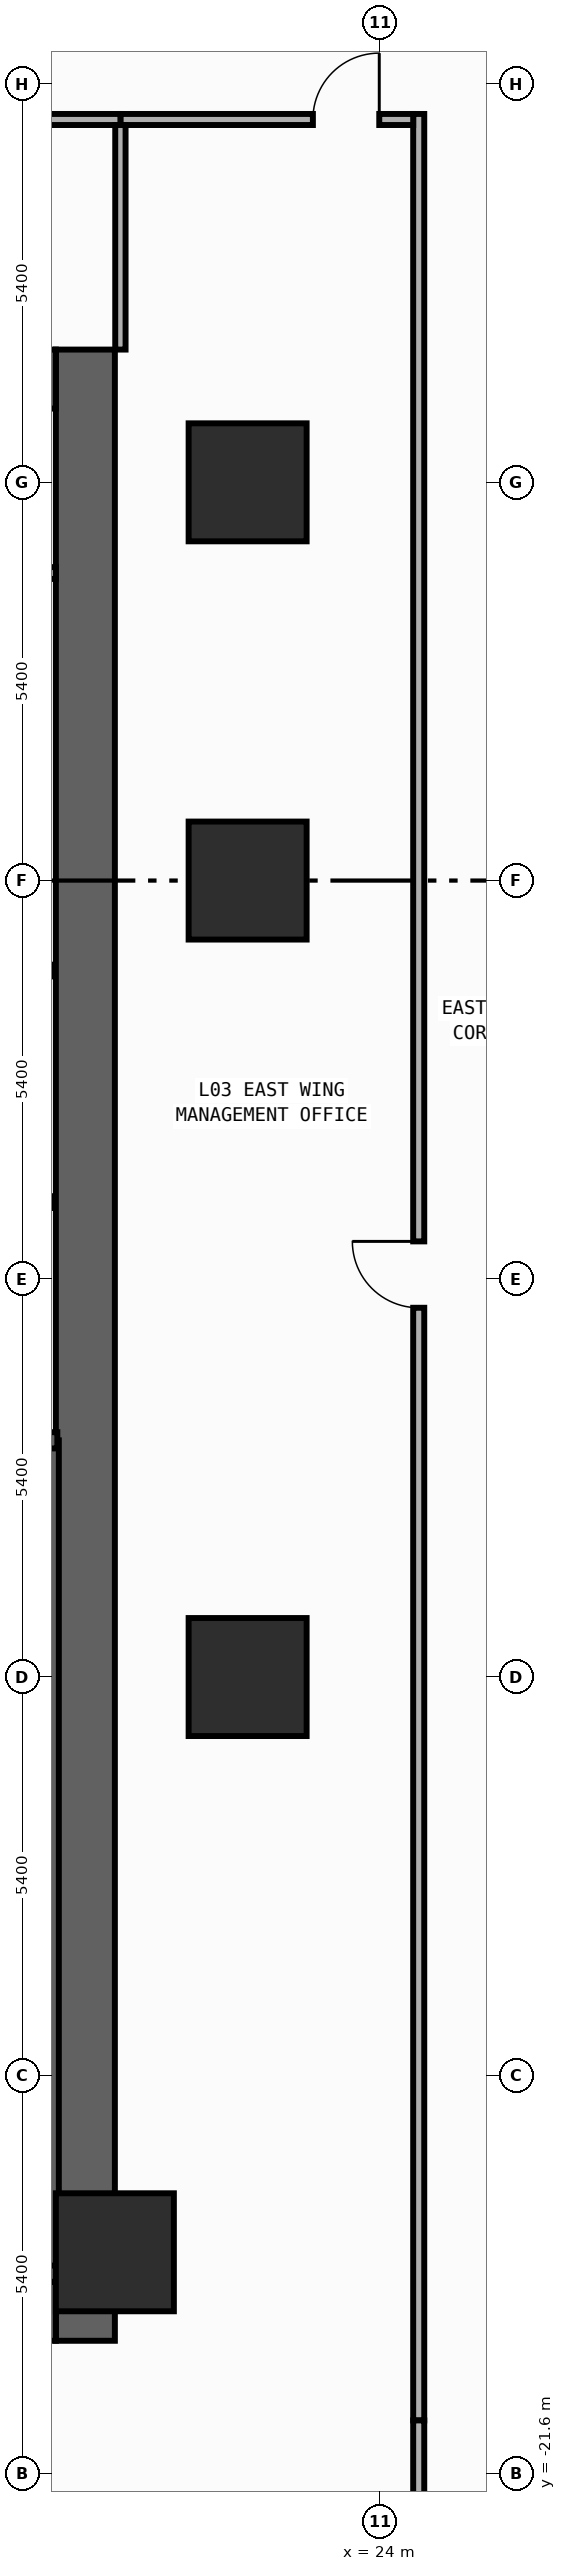
"""IFC4 building model, lengths in metres.
Left out: names, types, materials, properties, quantities, classifications, styles, units other than length and angle.
Written with IfcOpenShell. Run it as: python <this file> out.ifc"""

import sys

from ifc_helpers import new_model, si_unit, direction, frame, frame_2d, origin, origin_2d, place, context, subcontext, project, spatial, rectangle, extrude, element, fill, save


model = new_model("IFC4")
c1 = context("Model", 3, precision=1e-05, world=origin(), true_north=direction((0.0, 1.0)))
c2 = subcontext(c1, "Body", "Model", "MODEL_VIEW")
j1 = project(units=[si_unit("LENGTHUNIT", "METRE"), si_unit("PLANEANGLEUNIT", "RADIAN")], contexts=[c1])
p1 = place(None, origin())
s1 = spatial("IfcSite", under=j1, at=p1, CompositionType="ELEMENT")
p2 = place(p1, origin())
s2 = spatial("IfcBuilding", under=s1, at=p2, CompositionType="ELEMENT")
p3 = place(p2, frame((0.0, 0.0, 11.0)))
s3 = spatial("IfcBuildingStorey", under=s2, at=p3, CompositionType="ELEMENT", Elevation=11.0)
p4 = place(p3, frame((20.0, -19.8, 0.0), z_axis=(0.0, 0.0, 1.0), x_axis=(0.0, 1.0, 0.0)))
e1 = element("IfcWall", 1, at=p4, inside=s3, PredefinedType="SHEAR", context=c2, shape_type="SweptSolid", body=[
    extrude(rectangle(XDim=27.0, YDim=0.8, at=frame_2d((13.5, 0.0))), origin(), (0.0, 0.0, 1.0), 4.7),
])
for number, where, z_axis, x_axis in (
    (2, (12.8, -19.4, 0.0), (0.0, 0.0, 1.0), (1.0, 0.0, 0.0)),
    (3, (12.8, 6.8, 0.0), (0.0, 0.0, 1.0), (1.0, 0.0, 0.0)),
):
    element("IfcWall", number, at=place(p3, frame(where, z_axis=z_axis, x_axis=x_axis)), inside=s3, PredefinedType="SHEAR", context=c2, shape_type="SweptSolid", body=[
        extrude(rectangle(XDim=6.8, YDim=0.8, at=frame_2d((3.4, 0.0))), origin(), (0.0, 0.0, 1.0), 4.7),
    ])
p5 = place(p3, frame((19.53, -18.89, 0.0), z_axis=(0.0, 0.0, 1.0), x_axis=(0.0, 1.0, 0.0)))
e4 = element("IfcWall", 4, at=p5, inside=s3, PredefinedType="SHEAR", context=c2, shape_type="SweptSolid", body=[
    extrude(rectangle(XDim=11.3, YDim=0.22, at=frame_2d((5.65, 0.0))), origin(), (0.0, 0.0, 1.0), 4.7),
])
p6 = place(p3, frame((15.705, -18.89, 0.0), z_axis=(0.0, 0.0, 1.0), x_axis=(1.0, 0.0, 0.0)))
e5 = element("IfcWall", 5, at=p6, inside=s3, PredefinedType="SHEAR", context=c2, shape_type="SweptSolid", body=[
    extrude(rectangle(XDim=3.915, YDim=0.22, at=frame_2d((1.958, 0.0))), origin(), (0.0, 0.0, 1.0), 4.7),
])
p7 = place(p3, frame((19.62, -7.59, 0.0), z_axis=(0.0, 0.0, 1.0), x_axis=(-1.0, 0.0, 0.0)))
e6 = element("IfcWall", 6, at=p7, inside=s3, PredefinedType="SHEAR", context=c2, shape_type="SweptSolid", body=[
    extrude(rectangle(XDim=3.915, YDim=0.22, at=frame_2d((1.958, 0.0))), origin(), (0.0, 0.0, 1.0), 4.7),
])
p8 = place(p7, frame((1.08, 0.0, 0.0)))
e7 = element("IfcOpeningElement", 7, at=p8, cuts=e6, PredefinedType="OPENING", context=c2, shape_type="SweptSolid", body=[
    extrude(rectangle(XDim=1.1, YDim=2.2, at=frame_2d((0.55, 1.1))), frame((0.0, 0.12, 0.0), z_axis=(0.0, -1.0, 0.0), x_axis=(1.0, 0.0, 0.0)), (0.0, 0.0, 1.0), 0.24),
])
for number, where, z_axis, x_axis in (
    (8, (20.4, -18.6, 0.0), (0.0, 0.0, 1.0), (1.0, 0.0, 0.0)),
    (9, (22.2, -10.8, 0.0), (0.0, 0.0, 1.0), (1.0, 0.0, 0.0)),
    (10, (22.2, 0.0, 0.0), (0.0, 0.0, 1.0), (1.0, 0.0, 0.0)),
    (11, (22.2, 5.4, 0.0), (0.0, 0.0, 1.0), (1.0, 0.0, 0.0)),
):
    element("IfcColumn", number, at=place(p3, frame(where, z_axis=z_axis, x_axis=x_axis)), inside=s3, PredefinedType="COLUMN", context=c2, shape_type="SweptSolid", body=[
        extrude(rectangle(XDim=1.6, YDim=1.6, at=origin_2d()), origin(), (0.0, 0.0, 1.0), 5.0),
    ])
p9 = place(p3, frame((17.31, 4.17, 0.0), z_axis=(0.0, 0.0, 1.0), x_axis=(1.0, 0.0, 0.0)))
e12 = element("IfcWall", 12, at=p9, inside=s3, PredefinedType="PARTITIONING", context=c2, shape_type="SweptSolid", body=[
    extrude(rectangle(XDim=2.29, YDim=0.16, at=frame_2d((1.145, 0.0))), origin(), (0.0, 0.0, 1.0), 4.7),
])
p10 = place(p3, frame((24.52, -20.88, 0.0), z_axis=(0.0, 0.0, 1.0), x_axis=(0.0, 1.0, 0.0)))
e13 = element("IfcWall", 13, at=p10, inside=s3, PredefinedType="PARTITIONING", context=c2, shape_type="SweptSolid", body=[
    extrude(rectangle(XDim=31.275, YDim=0.15, at=frame_2d((15.637, 0.0))), origin(), (0.0, 0.0, 1.0), 4.7),
])
p11 = place(p10, frame((15.087, 0.0, 0.0)))
e14 = element("IfcOpeningElement", 14, at=p11, cuts=e13, PredefinedType="OPENING", context=c2, shape_type="SweptSolid", body=[
    extrude(rectangle(XDim=0.9, YDim=2.15, at=frame_2d((0.45, 1.075))), frame((0.0, 0.085, 0.0), z_axis=(0.0, -1.0, 0.0), x_axis=(1.0, 0.0, 0.0)), (0.0, 0.0, 1.0), 0.17),
])
p12 = place(p3, frame((24.52, -27.413, 0.0), z_axis=(0.0, 0.0, 1.0), x_axis=(0.0, 1.0, 0.0)))
e15 = element("IfcWall", 15, at=p12, inside=s3, PredefinedType="PARTITIONING", context=c2, shape_type="SweptSolid", body=[
    extrude(rectangle(XDim=6.533, YDim=0.15, at=frame_2d((3.266, 0.0))), origin(), (0.0, 0.0, 1.0), 4.7),
])
p13 = place(p12, frame((3.943, 0.0, 0.0)))
e16 = element("IfcOpeningElement", 16, at=p13, cuts=e15, PredefinedType="OPENING", context=c2, shape_type="SweptSolid", body=[
    extrude(rectangle(XDim=0.9, YDim=2.15, at=frame_2d((0.45, 1.075))), frame((0.0, 0.085, 0.0), z_axis=(0.0, -1.0, 0.0), x_axis=(1.0, 0.0, 0.0)), (0.0, 0.0, 1.0), 0.17),
])
p14 = place(p3, frame((20.475, 10.32, 0.0), z_axis=(0.0, 0.0, 1.0), x_axis=(1.0, 0.0, 0.0)))
e17 = element("IfcWall", 17, at=p14, inside=s3, PredefinedType="PARTITIONING", context=c2, shape_type="SweptSolid", body=[
    extrude(rectangle(XDim=3.97, YDim=0.15, at=frame_2d((1.985, 0.0))), origin(), (0.0, 0.0, 1.0), 4.7),
])
p15 = place(p14, frame((2.61, 0.0, 0.0)))
e18 = element("IfcOpeningElement", 18, at=p15, cuts=e17, PredefinedType="OPENING", context=c2, shape_type="SweptSolid", body=[
    extrude(rectangle(XDim=0.9, YDim=2.15, at=frame_2d((0.45, 1.075))), frame((0.0, 0.085, 0.0), z_axis=(0.0, -1.0, 0.0), x_axis=(1.0, 0.0, 0.0)), (0.0, 0.0, 1.0), 0.17),
])
p16 = place(p3, frame((12.065, 10.32, 0.0), z_axis=(0.0, 0.0, 1.0), x_axis=(1.0, 0.0, 0.0)))
e19 = element("IfcWall", 19, at=p16, inside=s3, PredefinedType="PARTITIONING", context=c2, shape_type="SweptSolid", body=[
    extrude(rectangle(XDim=8.41, YDim=0.15, at=frame_2d((4.205, 0.0))), origin(), (0.0, 0.0, 1.0), 4.7),
])
p17 = place(p16, frame((4.785, 0.0, 0.0)))
e20 = element("IfcOpeningElement", 20, at=p17, cuts=e19, PredefinedType="OPENING", context=c2, shape_type="SweptSolid", body=[
    extrude(rectangle(XDim=0.9, YDim=2.15, at=frame_2d((0.45, 1.075))), frame((0.0, 0.085, 0.0), z_axis=(0.0, -1.0, 0.0), x_axis=(1.0, 0.0, 0.0)), (0.0, 0.0, 1.0), 0.17),
])
p18 = place(p3, frame((20.475, 7.2, 0.0), z_axis=(0.0, 0.0, 1.0), x_axis=(0.0, 1.0, 0.0)))
e21 = element("IfcWall", 21, at=p18, inside=s3, PredefinedType="PARTITIONING", context=c2, shape_type="SweptSolid", body=[
    extrude(rectangle(XDim=3.045, YDim=0.14, at=frame_2d((1.522, 0.0))), origin(), (0.0, 0.0, 1.0), 4.7),
])
p19 = place(p11, origin())
e22 = element("IfcDoor", 22, at=p19, inside=s3, OperationType="SINGLE_SWING_RIGHT", PredefinedType="DOOR", context=c2, shape_type="SweptSolid", body=[
    extrude(rectangle(XDim=0.9, YDim=2.15, at=frame_2d((0.45, 1.075))), frame((0.0, 0.025, 0.0), z_axis=(0.0, -1.0, 0.0), x_axis=(1.0, 0.0, 0.0)), (0.0, 0.0, 1.0), 0.05),
])
fill(e14, e22)
p20 = place(p15, origin())
e23 = element("IfcDoor", 23, at=p20, inside=s3, OperationType="SINGLE_SWING_RIGHT", PredefinedType="DOOR", context=c2, shape_type="SweptSolid", body=[
    extrude(rectangle(XDim=0.9, YDim=2.15, at=frame_2d((0.45, 1.075))), frame((0.0, 0.025, 0.0), z_axis=(0.0, -1.0, 0.0), x_axis=(1.0, 0.0, 0.0)), (0.0, 0.0, 1.0), 0.05),
])
fill(e18, e23)
save(model, sys.argv[1])
